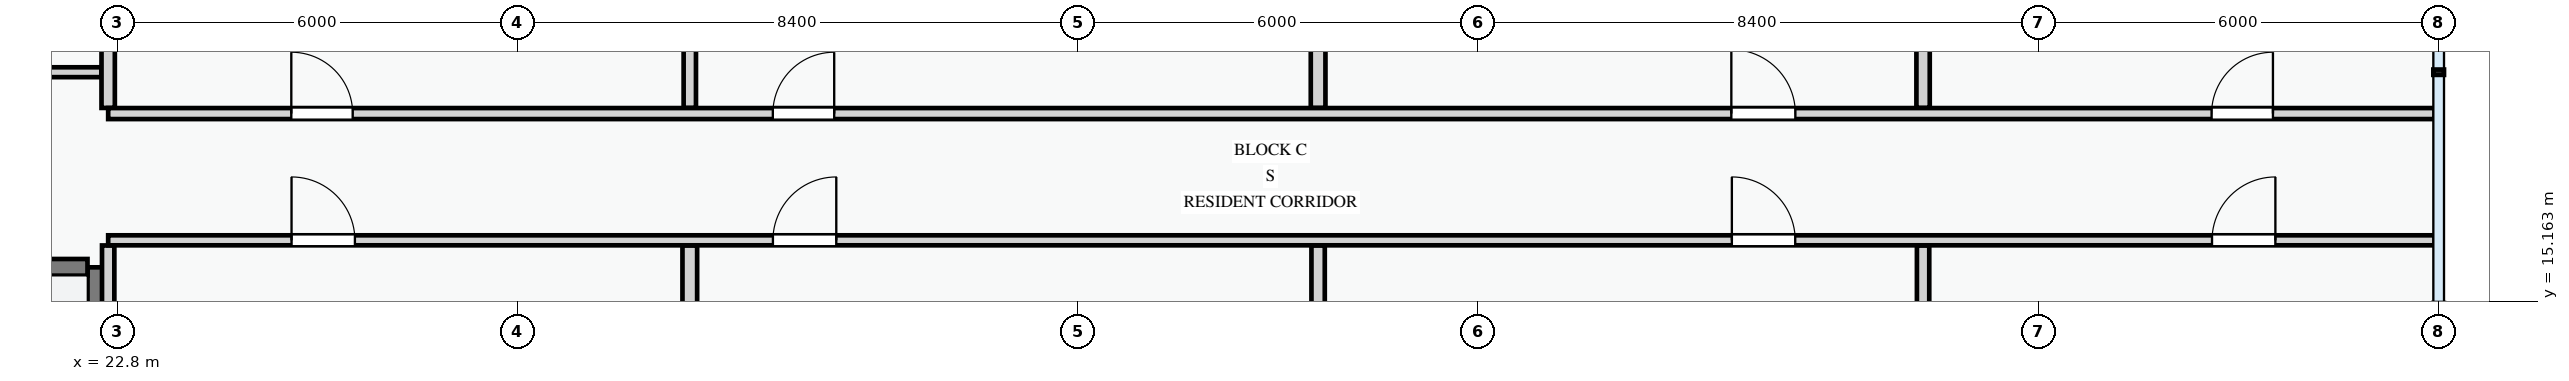
"""IFC4 building model, lengths in metres.
Left out: names, types, materials, properties, quantities, classifications, styles, units other than length and angle.
Written with IfcOpenShell. Run it as: python <this file> out.ifc"""

import sys

from ifc_helpers import new_model, si_unit, direction, frame, frame_2d, origin, place, context, subcontext, project, spatial, rectangle, extrude, element, fill, save


model = new_model("IFC4")
c1 = context("Model", 3, precision=1e-05, world=origin(), true_north=direction((0.0, 1.0)))
c2 = subcontext(c1, "Body", "Model", "MODEL_VIEW")
j1 = project(units=[si_unit("LENGTHUNIT", "METRE"), si_unit("PLANEANGLEUNIT", "RADIAN")], contexts=[c1])
p1 = place(None, origin())
s1 = spatial("IfcSite", under=j1, at=p1, CompositionType="ELEMENT")
p2 = place(p1, origin())
s2 = spatial("IfcBuilding", under=s1, at=p2, CompositionType="ELEMENT")
p3 = place(p2, frame((0.0, 0.0, 4.5)))
s3 = spatial("IfcBuildingStorey", under=s2, at=p3, CompositionType="ELEMENT", Elevation=4.5)
p4 = place(p3, frame((22.475, 8.75, 0.0), z_axis=(0.0, 0.0, 1.0), x_axis=(0.0, 1.0, 0.0)))
e1 = element("IfcWall", 1, at=p4, inside=s3, PredefinedType="SHEAR", context=c2, shape_type="SweptSolid", body=[
    extrude(rectangle(XDim=6.925, YDim=0.25, at=frame_2d((3.462, 0.0))), origin(), (0.0, 0.0, 1.0), 3.3),
])
p5 = place(p3, frame((8.85, 15.675, 0.0), z_axis=(0.0, 0.0, 1.0), x_axis=(1.0, 0.0, 0.0)))
e2 = element("IfcWall", 2, at=p5, inside=s3, PredefinedType="SHEAR", context=c2, shape_type="SweptSolid", body=[
    extrude(rectangle(XDim=13.5, YDim=0.25, at=frame_2d((6.75, 0.0))), origin(), (0.0, 0.0, 1.0), 3.3),
])
p6 = place(p5, frame((6.2, 0.0, 0.0)))
e3 = element("IfcOpeningElement", 3, at=p6, cuts=e2, PredefinedType="OPENING", context=c2, shape_type="SweptSolid", body=[
    extrude(rectangle(XDim=1.1, YDim=2.15, at=frame_2d((0.55, 1.075))), frame((0.0, 0.135, 0.0), z_axis=(0.0, -1.0, 0.0), x_axis=(1.0, 0.0, 0.0)), (0.0, 0.0, 1.0), 0.27),
])
p7 = place(p3, frame((18.025, 18.6, 0.0), z_axis=(0.0, 0.0, 1.0), x_axis=(1.0, 0.0, 0.0)))
e4 = element("IfcWall", 4, at=p7, inside=s3, PredefinedType="PARTITIONING", context=c2, shape_type="SweptSolid", body=[
    extrude(rectangle(XDim=4.533, YDim=0.148, at=frame_2d((2.267, 0.0))), origin(), (0.0, 0.0, 1.0), 3.3),
])
p8 = place(p7, frame((1.65, 0.0, 0.0)))
e5 = element("IfcOpeningElement", 5, at=p8, cuts=e4, PredefinedType="OPENING", context=c2, shape_type="SweptSolid", body=[
    extrude(rectangle(XDim=1.0, YDim=2.15, at=frame_2d((0.5, 1.075))), frame((0.0, 0.084, 0.0), z_axis=(0.0, -1.0, 0.0), x_axis=(1.0, 0.0, 0.0)), (0.0, 0.0, 1.0), 0.168),
])
p9 = place(p3, frame((22.66, 8.52, 0.0), z_axis=(0.0, 0.0, 1.0), x_axis=(0.0, 1.0, 0.0)))
e6 = element("IfcWall", 6, at=p9, inside=s3, PredefinedType="PARTITIONING", context=c2, shape_type="SweptSolid", body=[
    extrude(rectangle(XDim=7.483, YDim=0.185, at=frame_2d((3.742, 0.0))), origin(), (0.0, 0.0, 1.0), 2.725),
])
p10 = place(p3, frame((22.66, 18.064, 0.0), z_axis=(0.0, 0.0, 1.0), x_axis=(0.0, 1.0, 0.0)))
e7 = element("IfcWall", 7, at=p10, inside=s3, PredefinedType="PARTITIONING", context=c2, shape_type="SweptSolid", body=[
    extrude(rectangle(XDim=4.676, YDim=0.2, at=frame_2d((2.338, 0.0))), origin(), (0.0, 0.0, 1.0), 2.725),
])
p11 = place(p3, frame((31.38, 8.46, 0.0), z_axis=(0.0, 0.0, 1.0), x_axis=(0.0, 1.0, 0.0)))
e8 = element("IfcWall", 8, at=p11, inside=s3, PredefinedType="PARTITIONING", context=c2, shape_type="SweptSolid", body=[
    extrude(rectangle(XDim=7.543, YDim=0.22, at=frame_2d((3.771, 0.0))), origin(), (0.0, 0.0, 1.0), 3.3),
])
p12 = place(p3, frame((31.38, 18.064, 0.0), z_axis=(0.0, 0.0, 1.0), x_axis=(0.0, 1.0, 0.0)))
e9 = element("IfcWall", 9, at=p12, inside=s3, PredefinedType="PARTITIONING", context=c2, shape_type="SweptSolid", body=[
    extrude(rectangle(XDim=4.616, YDim=0.185, at=frame_2d((2.308, 0.0))), origin(), (0.0, 0.0, 1.0), 3.3),
])
p13 = place(p3, frame((40.8, 8.52, 0.0), z_axis=(0.0, 0.0, 1.0), x_axis=(0.0, 1.0, 0.0)))
e10 = element("IfcWall", 10, at=p13, inside=s3, PredefinedType="PARTITIONING", context=c2, shape_type="SweptSolid", body=[
    extrude(rectangle(XDim=7.483, YDim=0.2, at=frame_2d((3.742, 0.0))), origin(), (0.0, 0.0, 1.0), 3.3),
])
p14 = place(p3, frame((40.8, 18.064, 0.0), z_axis=(0.0, 0.0, 1.0), x_axis=(0.0, 1.0, 0.0)))
e11 = element("IfcWall", 11, at=p14, inside=s3, PredefinedType="PARTITIONING", context=c2, shape_type="SweptSolid", body=[
    extrude(rectangle(XDim=4.616, YDim=0.22, at=frame_2d((2.308, 0.0))), origin(), (0.0, 0.0, 1.0), 3.3),
])
p15 = place(p3, frame((49.87, 8.52, 0.0), z_axis=(0.0, 0.0, 1.0), x_axis=(0.0, 1.0, 0.0)))
e12 = element("IfcWall", 12, at=p15, inside=s3, PredefinedType="PARTITIONING", context=c2, shape_type="SweptSolid", body=[
    extrude(rectangle(XDim=7.483, YDim=0.185, at=frame_2d((3.742, 0.0))), origin(), (0.0, 0.0, 1.0), 3.3),
])
p16 = place(p3, frame((49.87, 18.064, 0.0), z_axis=(0.0, 0.0, 1.0), x_axis=(0.0, 1.0, 0.0)))
e13 = element("IfcWall", 13, at=p16, inside=s3, PredefinedType="PARTITIONING", context=c2, shape_type="SweptSolid", body=[
    extrude(rectangle(XDim=4.676, YDim=0.2, at=frame_2d((2.338, 0.0))), origin(), (0.0, 0.0, 1.0), 3.3),
])
p17 = place(p3, frame((22.66, 16.08, 0.0), z_axis=(0.0, 0.0, 1.0), x_axis=(1.0, 0.0, 0.0)))
e14 = element("IfcWall", 14, at=p17, inside=s3, PredefinedType="PARTITIONING", context=c2, shape_type="SweptSolid", body=[
    extrude(rectangle(XDim=34.88, YDim=0.15, at=frame_2d((17.44, 0.0))), origin(), (0.0, 0.0, 1.0), 3.3),
])
p18 = place(p17, frame((2.749, 0.0, 0.0)))
e15 = element("IfcOpeningElement", 15, at=p18, cuts=e14, PredefinedType="OPENING", context=c2, shape_type="SweptSolid", body=[
    extrude(rectangle(XDim=0.95, YDim=2.1, at=frame_2d((0.475, 1.05))), frame((0.0, 0.085, 0.0), z_axis=(0.0, -1.0, 0.0), x_axis=(1.0, 0.0, 0.0)), (0.0, 0.0, 1.0), 0.17),
])
p19 = place(p17, frame((9.966, 0.0, 0.0)))
e16 = element("IfcOpeningElement", 16, at=p19, cuts=e14, PredefinedType="OPENING", context=c2, shape_type="SweptSolid", body=[
    extrude(rectangle(XDim=0.95, YDim=2.1, at=frame_2d((0.475, 1.05))), frame((0.0, 0.085, 0.0), z_axis=(0.0, -1.0, 0.0), x_axis=(1.0, 0.0, 0.0)), (0.0, 0.0, 1.0), 0.17),
])
p20 = place(p17, frame((24.343, 0.0, 0.0)))
e17 = element("IfcOpeningElement", 17, at=p20, cuts=e14, PredefinedType="OPENING", context=c2, shape_type="SweptSolid", body=[
    extrude(rectangle(XDim=0.95, YDim=2.1, at=frame_2d((0.475, 1.05))), frame((0.0, 0.085, 0.0), z_axis=(0.0, -1.0, 0.0), x_axis=(1.0, 0.0, 0.0)), (0.0, 0.0, 1.0), 0.17),
])
p21 = place(p17, frame((31.542, 0.0, 0.0)))
e18 = element("IfcOpeningElement", 18, at=p21, cuts=e14, PredefinedType="OPENING", context=c2, shape_type="SweptSolid", body=[
    extrude(rectangle(XDim=0.95, YDim=2.1, at=frame_2d((0.475, 1.05))), frame((0.0, 0.085, 0.0), z_axis=(0.0, -1.0, 0.0), x_axis=(1.0, 0.0, 0.0)), (0.0, 0.0, 1.0), 0.17),
])
p22 = place(p3, frame((22.66, 17.98, 0.0), z_axis=(0.0, 0.0, 1.0), x_axis=(1.0, 0.0, 0.0)))
e19 = element("IfcWall", 19, at=p22, inside=s3, PredefinedType="PARTITIONING", context=c2, shape_type="SweptSolid", body=[
    extrude(rectangle(XDim=34.88, YDim=0.165, at=frame_2d((17.44, 0.0))), origin(), (0.0, 0.0, 1.0), 3.3),
])
p23 = place(p22, frame((2.746, 0.0, 0.0)))
e20 = element("IfcOpeningElement", 20, at=p23, cuts=e19, PredefinedType="OPENING", context=c2, shape_type="SweptSolid", body=[
    extrude(rectangle(XDim=0.92, YDim=2.1, at=frame_2d((0.46, 1.05))), frame((0.0, 0.093, 0.0), z_axis=(0.0, -1.0, 0.0), x_axis=(1.0, 0.0, 0.0)), (0.0, 0.0, 1.0), 0.185),
])
p24 = place(p22, frame((9.965, 0.0, 0.0)))
e21 = element("IfcOpeningElement", 21, at=p24, cuts=e19, PredefinedType="OPENING", context=c2, shape_type="SweptSolid", body=[
    extrude(rectangle(XDim=0.92, YDim=2.1, at=frame_2d((0.46, 1.05))), frame((0.0, 0.093, 0.0), z_axis=(0.0, -1.0, 0.0), x_axis=(1.0, 0.0, 0.0)), (0.0, 0.0, 1.0), 0.185),
])
p25 = place(p22, frame((24.335, 0.0, 0.0)))
e22 = element("IfcOpeningElement", 22, at=p25, cuts=e19, PredefinedType="OPENING", context=c2, shape_type="SweptSolid", body=[
    extrude(rectangle(XDim=0.96, YDim=2.12, at=frame_2d((0.48, 1.06))), frame((0.0, 0.093, 0.0), z_axis=(0.0, -1.0, 0.0), x_axis=(1.0, 0.0, 0.0)), (0.0, 0.0, 1.0), 0.185),
])
p26 = place(p22, frame((31.535, 0.0, 0.0)))
e23 = element("IfcOpeningElement", 23, at=p26, cuts=e19, PredefinedType="OPENING", context=c2, shape_type="SweptSolid", body=[
    extrude(rectangle(XDim=0.92, YDim=2.1, at=frame_2d((0.46, 1.05))), frame((0.0, 0.093, 0.0), z_axis=(0.0, -1.0, 0.0), x_axis=(1.0, 0.0, 0.0)), (0.0, 0.0, 1.0), 0.185),
])
p27 = place(p18, origin())
e24 = element("IfcDoor", 24, at=p27, inside=s3, OperationType="SINGLE_SWING_LEFT", PredefinedType="DOOR", context=c2, shape_type="SweptSolid", body=[
    extrude(rectangle(XDim=0.95, YDim=2.1, at=frame_2d((0.475, 1.05))), frame((0.0, 0.025, 0.0), z_axis=(0.0, -1.0, 0.0), x_axis=(1.0, 0.0, 0.0)), (0.0, 0.0, 1.0), 0.05),
])
fill(e15, e24)
p28 = place(p19, origin())
e25 = element("IfcDoor", 25, at=p28, inside=s3, OperationType="SINGLE_SWING_RIGHT", PredefinedType="DOOR", context=c2, shape_type="SweptSolid", body=[
    extrude(rectangle(XDim=0.95, YDim=2.1, at=frame_2d((0.475, 1.05))), frame((0.0, 0.025, 0.0), z_axis=(0.0, -1.0, 0.0), x_axis=(1.0, 0.0, 0.0)), (0.0, 0.0, 1.0), 0.05),
])
fill(e16, e25)
p29 = place(p20, origin())
e26 = element("IfcDoor", 26, at=p29, inside=s3, OperationType="SINGLE_SWING_LEFT", PredefinedType="DOOR", context=c2, shape_type="SweptSolid", body=[
    extrude(rectangle(XDim=0.95, YDim=2.1, at=frame_2d((0.475, 1.05))), frame((0.0, 0.025, 0.0), z_axis=(0.0, -1.0, 0.0), x_axis=(1.0, 0.0, 0.0)), (0.0, 0.0, 1.0), 0.05),
])
fill(e17, e26)
p30 = place(p21, origin())
e27 = element("IfcDoor", 27, at=p30, inside=s3, OperationType="SINGLE_SWING_RIGHT", PredefinedType="DOOR", context=c2, shape_type="SweptSolid", body=[
    extrude(rectangle(XDim=0.95, YDim=2.1, at=frame_2d((0.475, 1.05))), frame((0.0, 0.025, 0.0), z_axis=(0.0, -1.0, 0.0), x_axis=(1.0, 0.0, 0.0)), (0.0, 0.0, 1.0), 0.05),
])
fill(e18, e27)
p31 = place(p23, origin())
e28 = element("IfcDoor", 28, at=p31, inside=s3, OperationType="SINGLE_SWING_LEFT", PredefinedType="DOOR", context=c2, shape_type="SweptSolid", body=[
    extrude(rectangle(XDim=0.92, YDim=2.1, at=frame_2d((0.46, 1.05))), frame((0.0, 0.025, 0.0), z_axis=(0.0, -1.0, 0.0), x_axis=(1.0, 0.0, 0.0)), (0.0, 0.0, 1.0), 0.05),
])
fill(e20, e28)
p32 = place(p24, origin())
e29 = element("IfcDoor", 29, at=p32, inside=s3, OperationType="SINGLE_SWING_RIGHT", PredefinedType="DOOR", context=c2, shape_type="SweptSolid", body=[
    extrude(rectangle(XDim=0.92, YDim=2.1, at=frame_2d((0.46, 1.05))), frame((0.0, 0.025, 0.0), z_axis=(0.0, -1.0, 0.0), x_axis=(1.0, 0.0, 0.0)), (0.0, 0.0, 1.0), 0.05),
])
fill(e21, e29)
p33 = place(p25, origin())
e30 = element("IfcDoor", 30, at=p33, inside=s3, OperationType="SINGLE_SWING_LEFT", PredefinedType="DOOR", context=c2, shape_type="SweptSolid", body=[
    extrude(rectangle(XDim=0.96, YDim=2.12, at=frame_2d((0.48, 1.06))), frame((0.0, 0.025, 0.0), z_axis=(0.0, -1.0, 0.0), x_axis=(1.0, 0.0, 0.0)), (0.0, 0.0, 1.0), 0.05),
])
fill(e22, e30)
p34 = place(p26, origin())
e31 = element("IfcDoor", 31, at=p34, inside=s3, OperationType="SINGLE_SWING_RIGHT", PredefinedType="DOOR", context=c2, shape_type="SweptSolid", body=[
    extrude(rectangle(XDim=0.92, YDim=2.1, at=frame_2d((0.46, 1.05))), frame((0.0, 0.025, 0.0), z_axis=(0.0, -1.0, 0.0), x_axis=(1.0, 0.0, 0.0)), (0.0, 0.0, 1.0), 0.05),
])
fill(e23, e31)
save(model, sys.argv[1])
